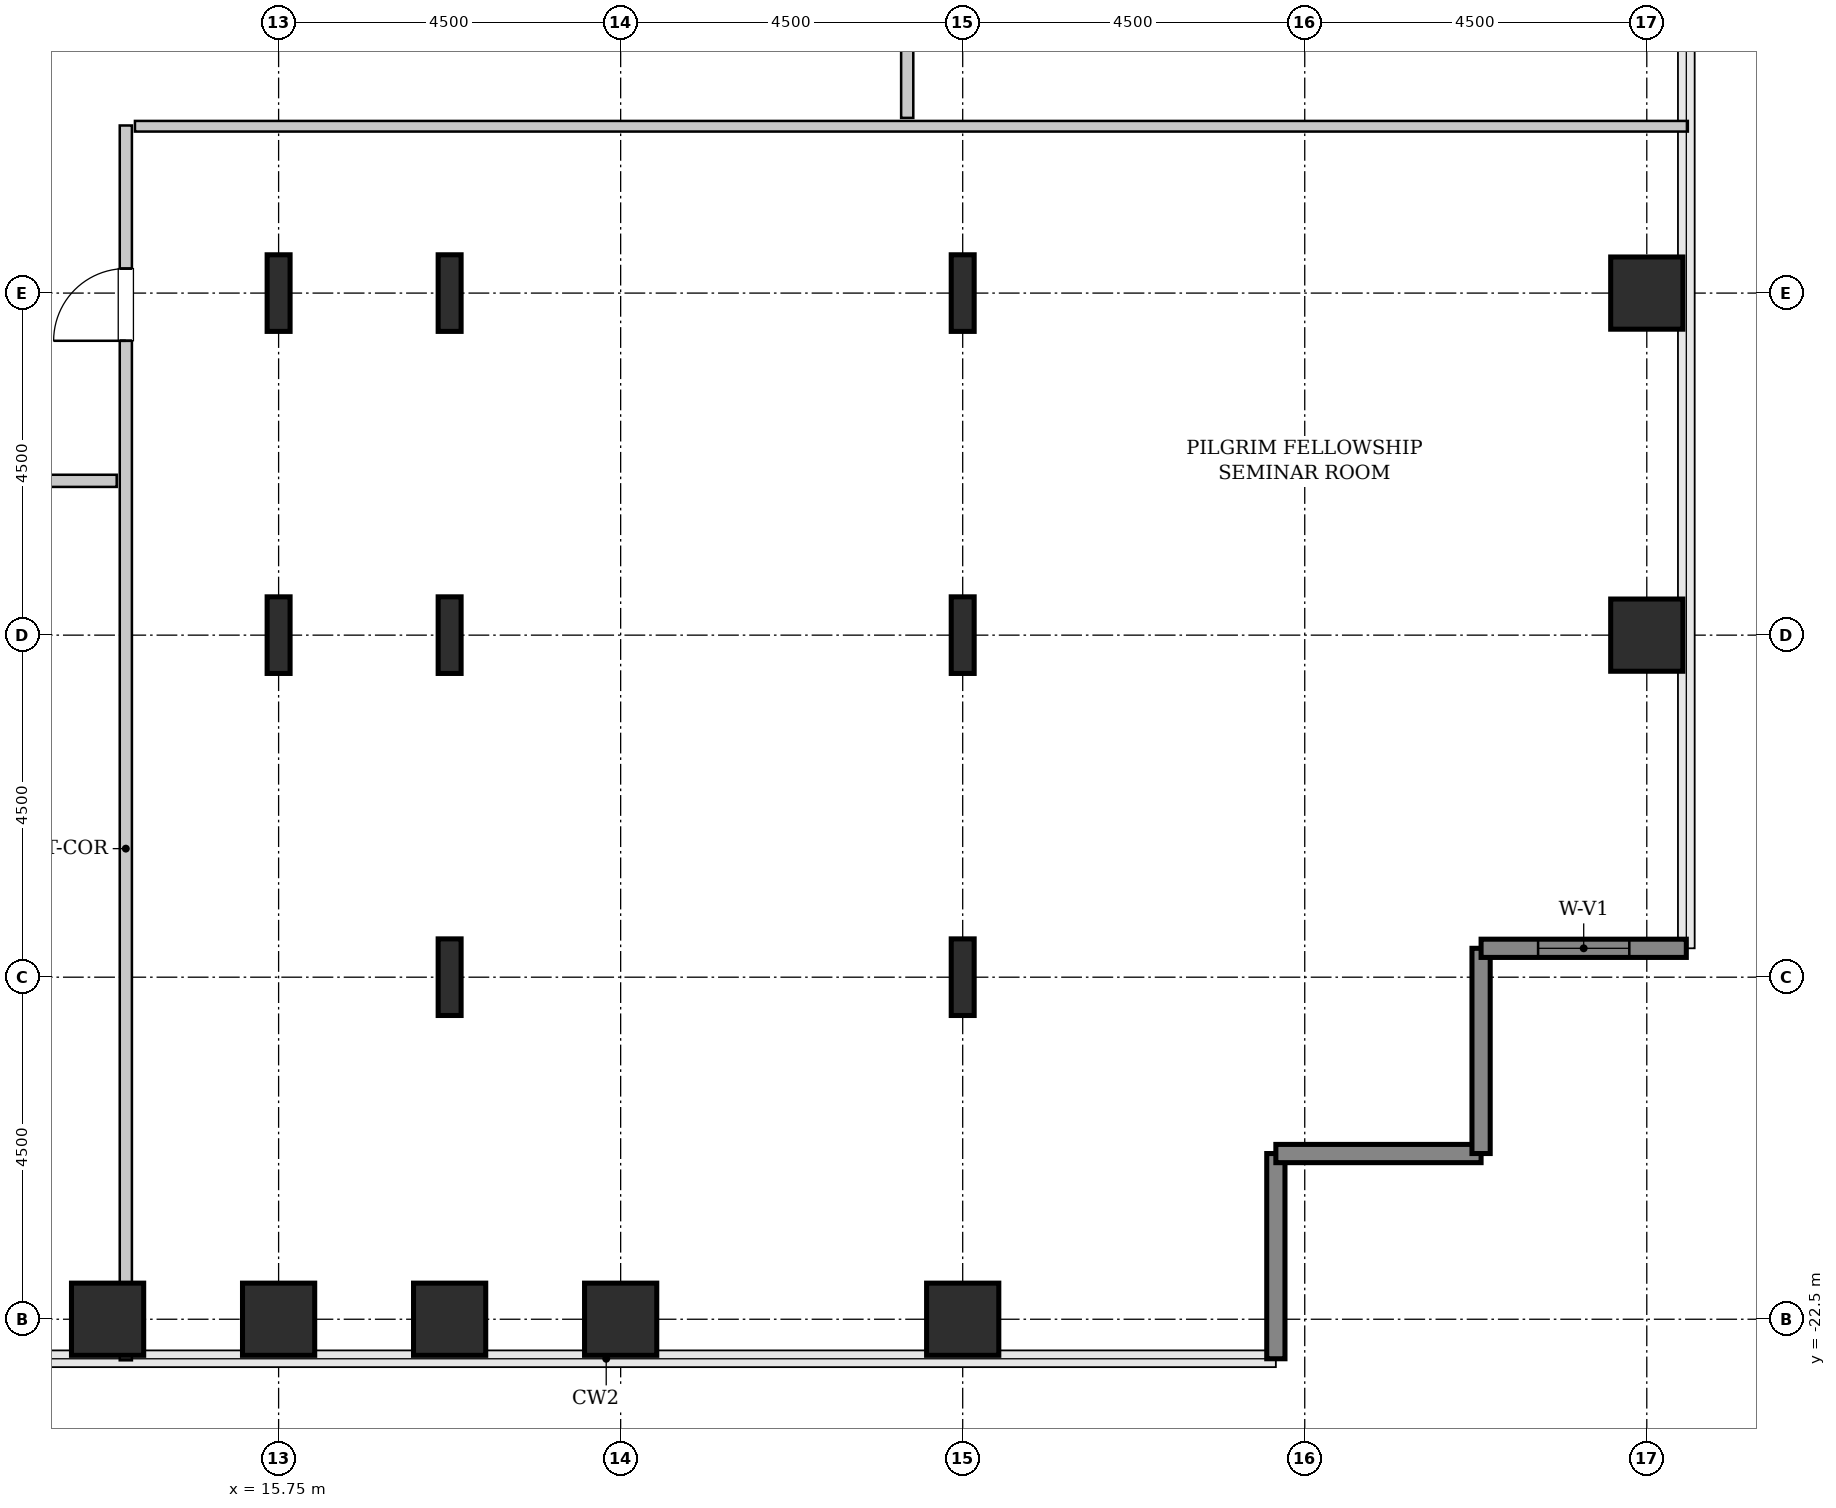
"""IFC4 building model, lengths in metres.
Left out: names, types, materials, properties, quantities, classifications, styles, units other than length and angle.
Written with IfcOpenShell. Run it as: python <this file> out.ifc"""

import sys

from ifc_helpers import new_model, si_unit, direction, frame, frame_2d, origin, origin_2d, place, context, subcontext, project, spatial, rectangle, hollow_rectangle, i_section, extrude, source, transform, mapped, element, fill, save


model = new_model("IFC4")
c1 = context("Model", 3, precision=1e-05, world=origin(), true_north=direction((0.0, 1.0)))
c2 = subcontext(c1, "Body", "Model", "MODEL_VIEW")
j1 = project(units=[si_unit("LENGTHUNIT", "METRE"), si_unit("PLANEANGLEUNIT", "RADIAN")], contexts=[c1])
p1 = place(None, origin())
s1 = spatial("IfcSite", under=j1, at=p1, CompositionType="ELEMENT")
p2 = place(p1, origin())
s2 = spatial("IfcBuilding", under=s1, at=p2, CompositionType="ELEMENT")
p3 = place(p2, frame((0.0, 0.0, 98.4)))
s3 = spatial("IfcBuildingStorey", under=s2, at=p3, CompositionType="ELEMENT", Elevation=98.4)
m1 = source(origin(), c2, "Body", "SweptSolid", [
    extrude(hollow_rectangle(XDim=0.95, YDim=0.95, WallThickness=0.045, InnerFilletRadius=0.045, OuterFilletRadius=0.09, at=origin_2d()), origin(), (0.0, 0.0, 1.0), 3.8),
])
for number, where, z_axis, x_axis in (
    (1, (13.5, -22.5, 0.0), (0.0, 0.0, 1.0), (1.0, 0.0, 0.0)),
    (2, (15.75, -22.5, 0.0), (0.0, 0.0, 1.0), (1.0, 0.0, 0.0)),
):
    element("IfcColumn", number, at=place(p3, frame(where, z_axis=z_axis, x_axis=x_axis)), inside=s3, PredefinedType="COLUMN", context=c2, shape_type="MappedRepresentation", body=[
        mapped(m1, transform((0.0, 0.0, 0.0), x_axis=(1.0, 0.0, 0.0), y_axis=(0.0, 1.0, 0.0), z_axis=(0.0, 0.0, 1.0), scale=1.0)),
    ])
m2 = source(origin(), c2, "Body", "SweptSolid", [
    extrude(i_section(OverallWidth=0.302, OverallDepth=1.008, WebThickness=0.021, FlangeThickness=0.04, FilletRadius=0.03, at=origin_2d()), origin(), (0.0, 0.0, 1.0), 3.8),
])
for number, where, z_axis, x_axis in (
    (3, (15.75, -13.5, 0.0), (0.0, 0.0, 1.0), (1.0, 0.0, 0.0)),
    (4, (15.75, -9.0, 0.0), (0.0, 0.0, 1.0), (1.0, 0.0, 0.0)),
):
    element("IfcColumn", number, at=place(p3, frame(where, z_axis=z_axis, x_axis=x_axis)), inside=s3, PredefinedType="COLUMN", context=c2, shape_type="MappedRepresentation", body=[
        mapped(m2, transform((0.0, 0.0, 0.0), x_axis=(1.0, 0.0, 0.0), y_axis=(0.0, 1.0, 0.0), z_axis=(0.0, 0.0, 1.0), scale=1.0)),
    ])
p4 = place(p3, frame((18.0, -22.5, 0.0), z_axis=(0.0, 0.0, 1.0), x_axis=(1.0, 0.0, 0.0)))
e5 = element("IfcColumn", 5, at=p4, inside=s3, PredefinedType="COLUMN", context=c2, shape_type="MappedRepresentation", body=[
    mapped(m1, transform((0.0, 0.0, 0.0), x_axis=(1.0, 0.0, 0.0), y_axis=(0.0, 1.0, 0.0), z_axis=(0.0, 0.0, 1.0), scale=1.0)),
])
for number, where, z_axis, x_axis in (
    (6, (18.0, -18.0, 0.0), (0.0, 0.0, 1.0), (1.0, 0.0, 0.0)),
    (7, (18.0, -13.5, 0.0), (0.0, 0.0, 1.0), (1.0, 0.0, 0.0)),
    (8, (18.0, -9.0, 0.0), (0.0, 0.0, 1.0), (1.0, 0.0, 0.0)),
):
    element("IfcColumn", number, at=place(p3, frame(where, z_axis=z_axis, x_axis=x_axis)), inside=s3, PredefinedType="COLUMN", context=c2, shape_type="MappedRepresentation", body=[
        mapped(m2, transform((0.0, 0.0, 0.0), x_axis=(1.0, 0.0, 0.0), y_axis=(0.0, 1.0, 0.0), z_axis=(0.0, 0.0, 1.0), scale=1.0)),
    ])
for number, where, z_axis, x_axis in (
    (9, (20.25, -22.5, 0.0), (0.0, 0.0, 1.0), (1.0, 0.0, 0.0)),
    (10, (24.75, -22.5, 0.0), (0.0, 0.0, 1.0), (1.0, 0.0, 0.0)),
):
    element("IfcColumn", number, at=place(p3, frame(where, z_axis=z_axis, x_axis=x_axis)), inside=s3, PredefinedType="COLUMN", context=c2, shape_type="MappedRepresentation", body=[
        mapped(m1, transform((0.0, 0.0, 0.0), x_axis=(1.0, 0.0, 0.0), y_axis=(0.0, 1.0, 0.0), z_axis=(0.0, 0.0, 1.0), scale=1.0)),
    ])
for number, where, z_axis, x_axis in (
    (11, (24.75, -18.0, 0.0), (0.0, 0.0, 1.0), (1.0, 0.0, 0.0)),
    (12, (24.75, -13.5, 0.0), (0.0, 0.0, 1.0), (1.0, 0.0, 0.0)),
    (13, (24.75, -9.0, 0.0), (0.0, 0.0, 1.0), (1.0, 0.0, 0.0)),
):
    element("IfcColumn", number, at=place(p3, frame(where, z_axis=z_axis, x_axis=x_axis)), inside=s3, PredefinedType="COLUMN", context=c2, shape_type="MappedRepresentation", body=[
        mapped(m2, transform((0.0, 0.0, 0.0), x_axis=(1.0, 0.0, 0.0), y_axis=(0.0, 1.0, 0.0), z_axis=(0.0, 0.0, 1.0), scale=1.0)),
    ])
for number, where, z_axis, x_axis in (
    (14, (33.75, -13.5, 0.0), (0.0, 0.0, 1.0), (1.0, 0.0, 0.0)),
    (15, (33.75, -9.0, 0.0), (0.0, 0.0, 1.0), (1.0, 0.0, 0.0)),
):
    element("IfcColumn", number, at=place(p3, frame(where, z_axis=z_axis, x_axis=x_axis)), inside=s3, PredefinedType="COLUMN", context=c2, shape_type="MappedRepresentation", body=[
        mapped(m1, transform((0.0, 0.0, 0.0), x_axis=(1.0, 0.0, 0.0), y_axis=(0.0, 1.0, 0.0), z_axis=(0.0, 0.0, 1.0), scale=1.0)),
    ])
m3 = source(origin(), c2, "Body", "SweptSolid", [
    extrude(rectangle(XDim=2.7, YDim=0.24, at=frame_2d((1.35, 0.0))), origin(), (0.0, 0.0, 1.0), 3.55),
])
for number, where, z_axis, x_axis in (
    (16, (28.87, -23.02, 0.0), (0.0, 0.0, 1.0), (0.0, 1.0, 0.0)),
    (17, (28.87, -20.32, 0.0), (0.0, 0.0, 1.0), (1.0, 0.0, 0.0)),
    (18, (31.57, -20.32, 0.0), (0.0, 0.0, 1.0), (0.0, 1.0, 0.0)),
):
    element("IfcWall", number, at=place(p3, frame(where, z_axis=z_axis, x_axis=x_axis)), inside=s3, PredefinedType="SHEAR", context=c2, shape_type="MappedRepresentation", body=[
        mapped(m3, transform((0.0, 0.0, 0.0), x_axis=(1.0, 0.0, 0.0), y_axis=(0.0, 1.0, 0.0), z_axis=(0.0, 0.0, 1.0), scale=1.0)),
    ])
p5 = place(p3, frame((31.57, -17.62, 0.0), z_axis=(0.0, 0.0, 1.0), x_axis=(1.0, 0.0, 0.0)))
e19 = element("IfcWall", 19, at=p5, inside=s3, PredefinedType="SHEAR", context=c2, shape_type="MappedRepresentation", body=[
    mapped(m3, transform((0.0, 0.0, 0.0), x_axis=(1.0, 0.0, 0.0), y_axis=(0.0, 1.0, 0.0), z_axis=(0.0, 0.0, 1.0), scale=1.0)),
])
p6 = place(p5, frame((0.75, 0.0, 0.85)))
e20 = element("IfcOpeningElement", 20, at=p6, cuts=e19, PredefinedType="OPENING", context=c2, shape_type="SweptSolid", body=[
    extrude(rectangle(XDim=1.2, YDim=1.8, at=frame_2d((0.6, 0.9))), frame((0.0, 0.13, 0.0), z_axis=(0.0, -1.0, 0.0), x_axis=(1.0, 0.0, 0.0)), (0.0, 0.0, 1.0), 0.26),
])
m4 = source(origin(), c2, "Body", "SweptSolid", [
    extrude(rectangle(XDim=16.245, YDim=0.16, at=frame_2d((8.123, 0.0))), origin(), (0.0, 0.0, 1.0), 3.535),
])
p7 = place(p3, frame((13.74, -23.04, 0.0), z_axis=(0.0, 0.0, 1.0), x_axis=(0.0, 1.0, 0.0)))
e21 = element("IfcWall", 21, at=p7, inside=s3, PredefinedType="PARTITIONING", context=c2, shape_type="MappedRepresentation", body=[
    mapped(m4, transform((0.0, 0.0, 0.0), x_axis=(1.0, 0.0, 0.0), y_axis=(0.0, 1.0, 0.0), z_axis=(0.0, 0.0, 1.0), scale=1.0)),
])
p8 = place(p7, frame((13.413, 0.0, 0.0)))
e22 = element("IfcOpeningElement", 22, at=p8, cuts=e21, PredefinedType="OPENING", context=c2, shape_type="SweptSolid", body=[
    extrude(rectangle(XDim=0.95, YDim=2.1, at=frame_2d((0.475, 1.05))), frame((0.0, 0.09, 0.0), z_axis=(0.0, -1.0, 0.0), x_axis=(1.0, 0.0, 0.0)), (0.0, 0.0, 1.0), 0.18),
])
m5 = source(origin(), c2, "Body", "SweptSolid", [
    extrude(rectangle(XDim=20.43, YDim=0.14, at=frame_2d((10.215, 0.0))), origin(), (0.0, 0.0, 1.0), 3.535),
])
p9 = place(p3, frame((13.86, -6.805, 0.0), z_axis=(0.0, 0.0, 1.0), x_axis=(1.0, 0.0, 0.0)))
e23 = element("IfcWall", 23, at=p9, inside=s3, PredefinedType="PARTITIONING", context=c2, shape_type="MappedRepresentation", body=[
    mapped(m5, transform((0.0, 0.0, 0.0), x_axis=(1.0, 0.0, 0.0), y_axis=(0.0, 1.0, 0.0), z_axis=(0.0, 0.0, 1.0), scale=1.0)),
])
m6 = source(origin(), c2, "Body", "SweptSolid", [
    extrude(rectangle(XDim=13.5, YDim=0.16, at=frame_2d((6.75, 0.0))), origin(), (0.0, 0.0, 1.0), 3.535),
])
p10 = place(p3, frame((24.02, -6.695, 0.0), z_axis=(0.0, 0.0, 1.0), x_axis=(0.0, 1.0, 0.0)))
e24 = element("IfcWall", 24, at=p10, inside=s3, PredefinedType="PARTITIONING", context=c2, shape_type="MappedRepresentation", body=[
    mapped(m6, transform((0.0, 0.0, 0.0), x_axis=(1.0, 0.0, 0.0), y_axis=(0.0, 1.0, 0.0), z_axis=(0.0, 0.0, 1.0), scale=1.0)),
])
p11 = place(p10, frame((3.97, 0.0, 0.0)))
e25 = element("IfcOpeningElement", 25, at=p11, cuts=e24, PredefinedType="OPENING", context=c2, shape_type="SweptSolid", body=[
    extrude(rectangle(XDim=0.95, YDim=2.1, at=frame_2d((0.475, 1.05))), frame((0.0, 0.09, 0.0), z_axis=(0.0, -1.0, 0.0), x_axis=(1.0, 0.0, 0.0)), (0.0, 0.0, 1.0), 0.18),
])
m7 = source(origin(), c2, "Body", "SweptSolid", [
    extrude(rectangle(XDim=6.225, YDim=0.16, at=frame_2d((3.113, 0.0))), origin(), (0.0, 0.0, 1.0), 3.535),
])
p12 = place(p3, frame((7.395, -11.47, 0.0), z_axis=(0.0, 0.0, 1.0), x_axis=(1.0, 0.0, 0.0)))
e26 = element("IfcWall", 26, at=p12, inside=s3, PredefinedType="PARTITIONING", context=c2, shape_type="MappedRepresentation", body=[
    mapped(m7, transform((0.0, 0.0, 0.0), x_axis=(1.0, 0.0, 0.0), y_axis=(0.0, 1.0, 0.0), z_axis=(0.0, 0.0, 1.0), scale=1.0)),
])
p13 = place(p12, frame((2.637, 0.0, 0.0)))
e27 = element("IfcOpeningElement", 27, at=p13, cuts=e26, PredefinedType="OPENING", context=c2, shape_type="SweptSolid", body=[
    extrude(rectangle(XDim=0.95, YDim=2.1, at=frame_2d((0.475, 1.05))), frame((0.0, 0.09, 0.0), z_axis=(0.0, -1.0, 0.0), x_axis=(1.0, 0.0, 0.0)), (0.0, 0.0, 1.0), 0.18),
])
m8 = source(origin(), c2, "Body", "SweptSolid", [
    extrude(rectangle(XDim=1.2, YDim=1.8, at=frame_2d((0.6, 0.9))), frame((0.0, 0.03, 0.0), z_axis=(0.0, -1.0, 0.0), x_axis=(1.0, 0.0, 0.0)), (0.0, 0.0, 1.0), 0.06),
])
p14 = place(p6, origin())
e28 = element("IfcWindow", 28, at=p14, inside=s3, PartitioningType="SINGLE_PANEL", PredefinedType="WINDOW", context=c2, shape_type="MappedRepresentation", body=[
    mapped(m8, transform((0.0, 0.0, 0.0), x_axis=(1.0, 0.0, 0.0), y_axis=(0.0, 1.0, 0.0), z_axis=(0.0, 0.0, 1.0), scale=1.0)),
])
fill(e20, e28)
m9 = source(origin(), c2, "Body", "SweptSolid", [
    extrude(rectangle(XDim=0.95, YDim=2.1, at=frame_2d((0.475, 1.05))), frame((0.0, 0.025, 0.0), z_axis=(0.0, -1.0, 0.0), x_axis=(1.0, 0.0, 0.0)), (0.0, 0.0, 1.0), 0.05),
])
p15 = place(p8, origin())
e29 = element("IfcDoor", 29, at=p15, inside=s3, OperationType="SINGLE_SWING_LEFT", PredefinedType="DOOR", context=c2, shape_type="MappedRepresentation", body=[
    mapped(m9, transform((0.0, 0.0, 0.0), x_axis=(1.0, 0.0, 0.0), y_axis=(0.0, 1.0, 0.0), z_axis=(0.0, 0.0, 1.0), scale=1.0)),
])
fill(e22, e29)
save(model, sys.argv[1])
